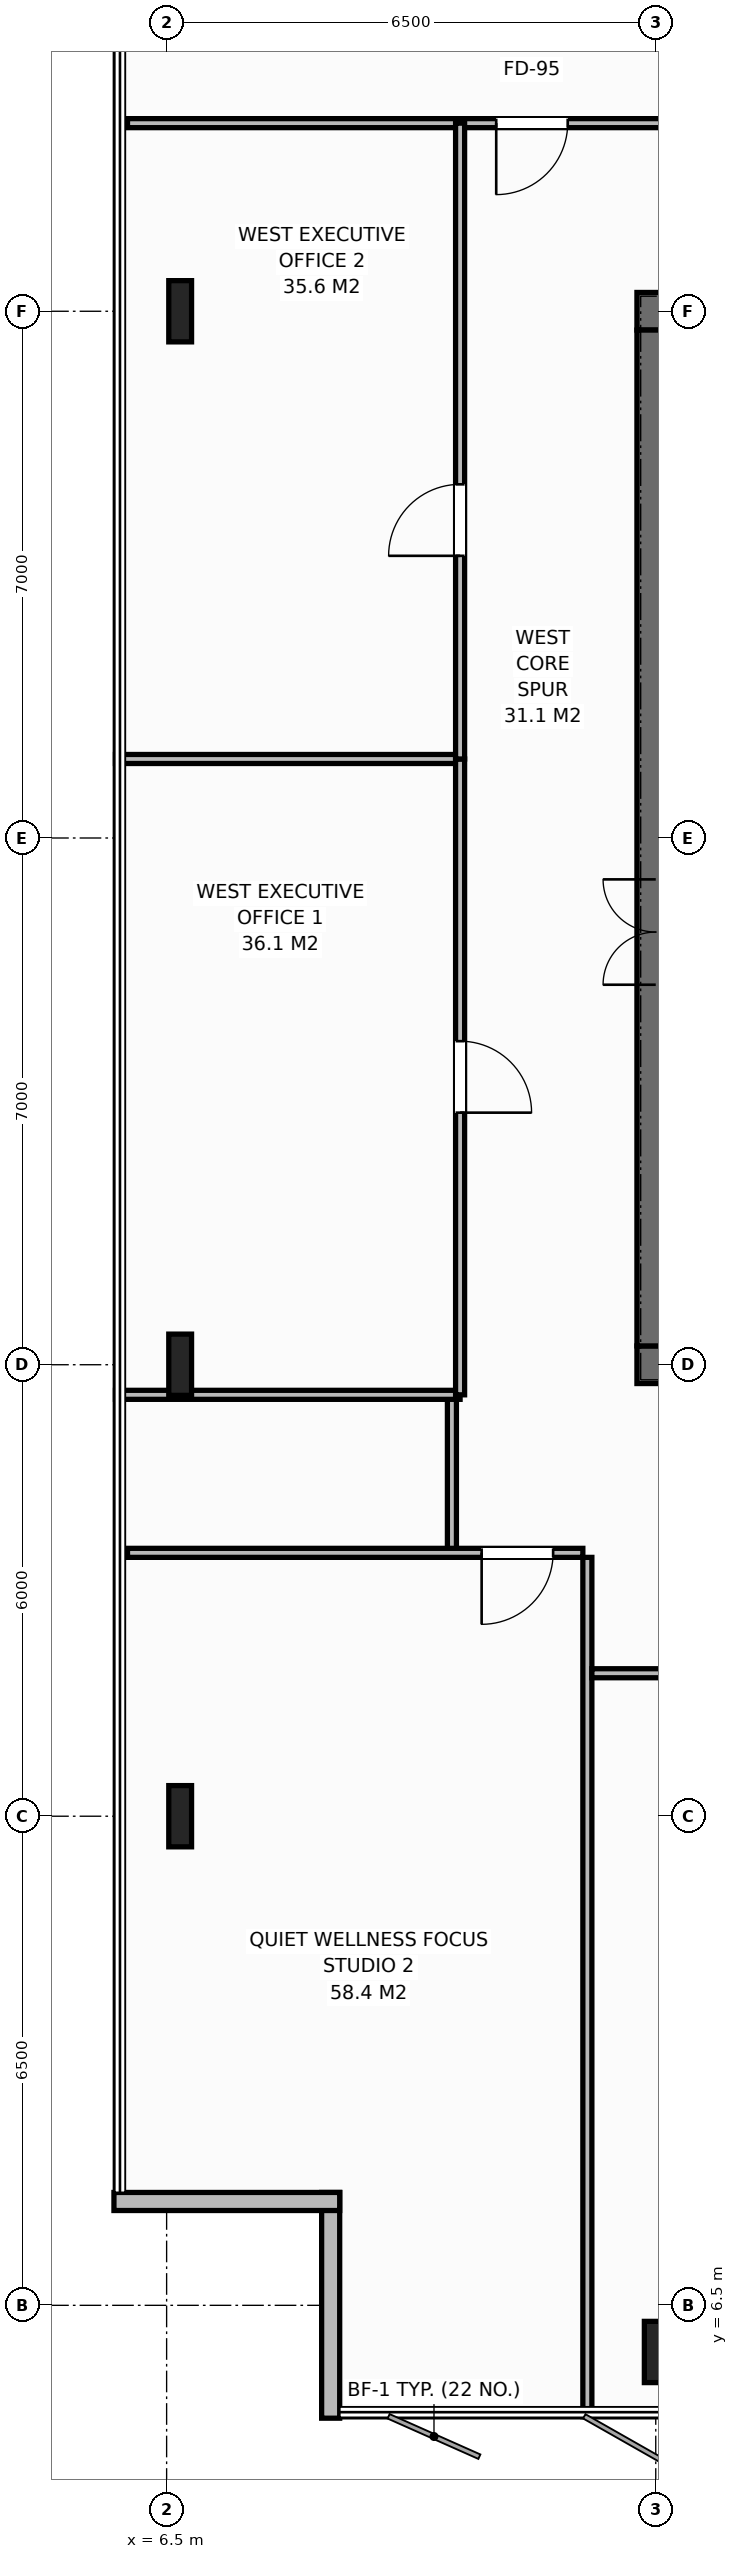
"""IFC4 building model, lengths in metres.
Left out: names, types, materials, properties, quantities, classifications, styles, units other than length and angle.
Written with IfcOpenShell. Run it as: python <this file> out.ifc"""

import sys

from ifc_helpers import new_model, si_unit, direction, frame, frame_2d, origin, origin_2d, place, context, subcontext, project, spatial, rectangle, i_section, extrude, element, fill, save


model = new_model("IFC4")
c1 = context("Model", 3, precision=1e-05, world=origin(), true_north=direction((0.0, 1.0)))
c2 = subcontext(c1, "Body", "Model", "MODEL_VIEW")
j1 = project(units=[si_unit("LENGTHUNIT", "METRE"), si_unit("PLANEANGLEUNIT", "RADIAN")], contexts=[c1])
p1 = place(None, origin())
s1 = spatial("IfcSite", under=j1, at=p1, CompositionType="ELEMENT")
p2 = place(p1, origin())
s2 = spatial("IfcBuilding", under=s1, at=p2, CompositionType="ELEMENT")
p3 = place(p2, frame((0.0, 0.0, 217.6)))
s3 = spatial("IfcBuildingStorey", under=s2, at=p3, CompositionType="ELEMENT", Elevation=217.6)
p4 = place(p3, frame((12.75, 19.0, 0.0), z_axis=(0.0, 0.0, 1.0), x_axis=(1.0, 0.0, 0.0)))
e1 = element("IfcWall", 1, at=p4, inside=s3, PredefinedType="SHEAR", context=c2, shape_type="SweptSolid", body=[
    extrude(rectangle(XDim=13.5, YDim=0.5, at=frame_2d((6.75, 0.0))), origin(), (0.0, 0.0, 1.0), 3.8),
])
p5 = place(p4, frame((9.13, 0.0, 0.0)))
e2 = element("IfcOpeningElement", 2, at=p5, cuts=e1, PredefinedType="OPENING", context=c2, shape_type="SweptSolid", body=[
    extrude(rectangle(XDim=1.4, YDim=2.2, at=frame_2d((0.7, 1.1))), frame((0.0, 0.26, 0.0), z_axis=(0.0, -1.0, 0.0), x_axis=(1.0, 0.0, 0.0)), (0.0, 0.0, 1.0), 0.52),
])
p6 = place(p3, frame((12.75, 33.0, 0.0), z_axis=(0.0, 0.0, 1.0), x_axis=(1.0, 0.0, 0.0)))
e3 = element("IfcWall", 3, at=p6, inside=s3, PredefinedType="SHEAR", context=c2, shape_type="SweptSolid", body=[
    extrude(rectangle(XDim=13.5, YDim=0.5, at=frame_2d((6.75, 0.0))), origin(), (0.0, 0.0, 1.0), 3.8),
])
p7 = place(p6, frame((1.15, 0.0, 0.0)))
e4 = element("IfcOpeningElement", 4, at=p7, cuts=e3, PredefinedType="OPENING", context=c2, shape_type="SweptSolid", body=[
    extrude(rectangle(XDim=0.9, YDim=2.15, at=frame_2d((0.45, 1.075))), frame((0.0, 0.26, 0.0), z_axis=(0.0, -1.0, 0.0), x_axis=(1.0, 0.0, 0.0)), (0.0, 0.0, 1.0), 0.52),
])
p8 = place(p6, frame((3.05, 0.0, 0.0)))
e5 = element("IfcOpeningElement", 5, at=p8, cuts=e3, PredefinedType="OPENING", context=c2, shape_type="SweptSolid", body=[
    extrude(rectangle(XDim=0.9, YDim=2.15, at=frame_2d((0.45, 1.075))), frame((0.0, 0.26, 0.0), z_axis=(0.0, -1.0, 0.0), x_axis=(1.0, 0.0, 0.0)), (0.0, 0.0, 1.0), 0.52),
])
p9 = place(p6, frame((4.85, 0.0, 0.0)))
e6 = element("IfcOpeningElement", 6, at=p9, cuts=e3, PredefinedType="OPENING", context=c2, shape_type="SweptSolid", body=[
    extrude(rectangle(XDim=0.9, YDim=2.15, at=frame_2d((0.45, 1.075))), frame((0.0, 0.26, 0.0), z_axis=(0.0, -1.0, 0.0), x_axis=(1.0, 0.0, 0.0)), (0.0, 0.0, 1.0), 0.52),
])
p10 = place(p6, frame((6.75, 0.0, 0.0)))
e7 = element("IfcOpeningElement", 7, at=p10, cuts=e3, PredefinedType="OPENING", context=c2, shape_type="SweptSolid", body=[
    extrude(rectangle(XDim=0.9, YDim=2.15, at=frame_2d((0.45, 1.075))), frame((0.0, 0.26, 0.0), z_axis=(0.0, -1.0, 0.0), x_axis=(1.0, 0.0, 0.0)), (0.0, 0.0, 1.0), 0.52),
])
p11 = place(p6, frame((9.13, 0.0, 0.0)))
e8 = element("IfcOpeningElement", 8, at=p11, cuts=e3, PredefinedType="OPENING", context=c2, shape_type="SweptSolid", body=[
    extrude(rectangle(XDim=1.4, YDim=2.2, at=frame_2d((0.7, 1.1))), frame((0.0, 0.26, 0.0), z_axis=(0.0, -1.0, 0.0), x_axis=(1.0, 0.0, 0.0)), (0.0, 0.0, 1.0), 0.52),
])
p12 = place(p3, frame((13.0, 19.25, 0.0), z_axis=(0.0, 0.0, 1.0), x_axis=(0.0, 1.0, 0.0)))
e9 = element("IfcWall", 9, at=p12, inside=s3, PredefinedType="SHEAR", context=c2, shape_type="SweptSolid", body=[
    extrude(rectangle(XDim=13.5, YDim=0.5, at=frame_2d((6.75, 0.0))), origin(), (0.0, 0.0, 1.0), 3.8),
])
p13 = place(p12, frame((4.8, 0.0, 0.0)))
e10 = element("IfcOpeningElement", 10, at=p13, cuts=e9, PredefinedType="OPENING", context=c2, shape_type="SweptSolid", body=[
    extrude(rectangle(XDim=1.4, YDim=2.2, at=frame_2d((0.7, 1.1))), frame((0.0, 0.26, 0.0), z_axis=(0.0, -1.0, 0.0), x_axis=(1.0, 0.0, 0.0)), (0.0, 0.0, 1.0), 0.52),
])
for number, where, z_axis, x_axis in (
    (11, (13.0, 5.88, 0.0), (0.0, 0.0, 1.0), (1.0, 0.0, 0.0)),
    (12, (6.68, 13.0, 0.0), (0.0, 0.0, 1.0), (1.0, 0.0, 0.0)),
    (13, (6.68, 19.0, 0.0), (0.0, 0.0, 1.0), (1.0, 0.0, 0.0)),
    (14, (6.68, 33.0, 0.0), (0.0, 0.0, 1.0), (1.0, 0.0, 0.0)),
):
    element("IfcColumn", number, at=place(p3, frame(where, z_axis=z_axis, x_axis=x_axis)), inside=s3, PredefinedType="COLUMN", context=c2, shape_type="SweptSolid", body=[
        extrude(i_section(OverallWidth=0.303, OverallDepth=0.814, WebThickness=0.021, FlangeThickness=0.04, at=origin_2d()), origin(), (0.0, 0.0, 1.0), 3.8),
    ])
for number, where, z_axis, x_axis in (
    (15, (8.68, 5.0, 0.0), (0.0, 0.0, 1.0), (0.0, 1.0, 0.0)),
    (16, (8.8, 7.88, 0.0), (0.0, 0.0, 1.0), (-1.0, 0.0, 0.0)),
):
    element("IfcWall", number, at=place(p3, frame(where, z_axis=z_axis, x_axis=x_axis)), inside=s3, PredefinedType="STANDARD", context=c2, shape_type="SweptSolid", body=[
        extrude(rectangle(XDim=3.0, YDim=0.24, at=frame_2d((1.5, 0.0))), origin(), (0.0, 0.0, 1.0), 3.58),
    ])
p14 = place(p3, frame((10.291, 16.5, 0.0), z_axis=(0.0, 0.0, 1.0), x_axis=(0.0, 1.0, 0.0)))
e17 = element("IfcWall", 17, at=p14, inside=s3, PredefinedType="PARTITIONING", context=c2, shape_type="SweptSolid", body=[
    extrude(rectangle(XDim=2.1, YDim=0.12, at=frame_2d((1.05, 0.0))), origin(), (0.0, 0.0, 1.0), 3.58),
])
p15 = place(p3, frame((5.98, 35.5, 0.0), z_axis=(0.0, 0.0, 1.0), x_axis=(1.0, 0.0, 0.0)))
e18 = element("IfcWall", 18, at=p15, inside=s3, PredefinedType="PARTITIONING", context=c2, shape_type="SweptSolid", body=[
    extrude(rectangle(XDim=12.329, YDim=0.12, at=frame_2d((6.165, 0.0))), origin(), (0.0, 0.0, 1.0), 3.58),
])
p16 = place(p15, frame((4.9, 0.0, 0.0)))
e19 = element("IfcOpeningElement", 19, at=p16, cuts=e18, PredefinedType="OPENING", context=c2, shape_type="SweptSolid", body=[
    extrude(rectangle(XDim=0.95, YDim=2.15, at=frame_2d((0.475, 1.075))), frame((0.0, 0.07, 0.0), z_axis=(0.0, -1.0, 0.0), x_axis=(1.0, 0.0, 0.0)), (0.0, 0.0, 1.0), 0.14),
])
p17 = place(p3, frame((12.091, 5.02, 0.0), z_axis=(0.0, 0.0, 1.0), x_axis=(0.0, 1.0, 0.0)))
e20 = element("IfcWall", 20, at=p17, inside=s3, PredefinedType="PARTITIONING", context=c2, shape_type="SweptSolid", body=[
    extrude(rectangle(XDim=11.42, YDim=0.12, at=frame_2d((5.71, 0.0))), origin(), (0.0, 0.0, 1.0), 3.58),
])
p18 = place(p3, frame((5.98, 16.5, 0.0), z_axis=(0.0, 0.0, 1.0), x_axis=(1.0, 0.0, 0.0)))
e21 = element("IfcWall", 21, at=p18, inside=s3, PredefinedType="PARTITIONING", context=c2, shape_type="SweptSolid", body=[
    extrude(rectangle(XDim=6.051, YDim=0.12, at=frame_2d((3.026, 0.0))), origin(), (0.0, 0.0, 1.0), 3.58),
])
p19 = place(p18, frame((4.706, 0.0, 0.0)))
e22 = element("IfcOpeningElement", 22, at=p19, cuts=e21, PredefinedType="OPENING", context=c2, shape_type="SweptSolid", body=[
    extrude(rectangle(XDim=0.95, YDim=2.15, at=frame_2d((0.475, 1.075))), frame((0.0, 0.07, 0.0), z_axis=(0.0, -1.0, 0.0), x_axis=(1.0, 0.0, 0.0)), (0.0, 0.0, 1.0), 0.14),
])
p20 = place(p3, frame((12.151, 14.9, 0.0), z_axis=(0.0, 0.0, 1.0), x_axis=(1.0, 0.0, 0.0)))
e23 = element("IfcWall", 23, at=p20, inside=s3, PredefinedType="PARTITIONING", context=c2, shape_type="SweptSolid", body=[
    extrude(rectangle(XDim=6.067, YDim=0.12, at=frame_2d((3.033, 0.0))), origin(), (0.0, 0.0, 1.0), 3.58),
])
p21 = place(p20, frame((2.558, 0.0, 0.0)))
e24 = element("IfcOpeningElement", 24, at=p21, cuts=e23, PredefinedType="OPENING", context=c2, shape_type="SweptSolid", body=[
    extrude(rectangle(XDim=0.95, YDim=2.15, at=frame_2d((0.475, 1.075))), frame((0.0, 0.07, 0.0), z_axis=(0.0, -1.0, 0.0), x_axis=(1.0, 0.0, 0.0)), (0.0, 0.0, 1.0), 0.14),
])
for number, where, z_axis, x_axis in (
    (25, (5.82, 18.6, 0.0), (0.0, 0.0, 1.0), (1.0, 0.0, 0.0)),
    (26, (5.82, 27.05, 0.0), (0.0, 0.0, 1.0), (1.0, 0.0, 0.0)),
):
    element("IfcWall", number, at=place(p3, frame(where, z_axis=z_axis, x_axis=x_axis)), inside=s3, PredefinedType="PARTITIONING", context=c2, shape_type="SweptSolid", body=[
        extrude(rectangle(XDim=4.58, YDim=0.12, at=frame_2d((2.29, 0.0))), origin(), (0.0, 0.0, 1.0), 3.58),
    ])
p22 = place(p3, frame((10.4, 18.6, 0.0), z_axis=(0.0, 0.0, 1.0), x_axis=(0.0, 1.0, 0.0)))
e27 = element("IfcWall", 27, at=p22, inside=s3, PredefinedType="PARTITIONING", context=c2, shape_type="SweptSolid", body=[
    extrude(rectangle(XDim=8.45, YDim=0.12, at=frame_2d((4.225, 0.0))), origin(), (0.0, 0.0, 1.0), 3.58),
])
p23 = place(p22, frame((3.75, 0.0, 0.0)))
e28 = element("IfcOpeningElement", 28, at=p23, cuts=e27, PredefinedType="OPENING", context=c2, shape_type="SweptSolid", body=[
    extrude(rectangle(XDim=0.95, YDim=2.15, at=frame_2d((0.475, 1.075))), frame((0.0, 0.07, 0.0), z_axis=(0.0, -1.0, 0.0), x_axis=(1.0, 0.0, 0.0)), (0.0, 0.0, 1.0), 0.14),
])
p24 = place(p3, frame((10.4, 27.05, 0.0), z_axis=(0.0, 0.0, 1.0), x_axis=(0.0, 1.0, 0.0)))
e29 = element("IfcWall", 29, at=p24, inside=s3, PredefinedType="PARTITIONING", context=c2, shape_type="SweptSolid", body=[
    extrude(rectangle(XDim=8.45, YDim=0.12, at=frame_2d((4.225, 0.0))), origin(), (0.0, 0.0, 1.0), 3.58),
])
p25 = place(p24, frame((2.7, 0.0, 0.0)))
e30 = element("IfcOpeningElement", 30, at=p25, cuts=e29, PredefinedType="OPENING", context=c2, shape_type="SweptSolid", body=[
    extrude(rectangle(XDim=0.95, YDim=2.15, at=frame_2d((0.475, 1.075))), frame((0.0, 0.07, 0.0), z_axis=(0.0, -1.0, 0.0), x_axis=(1.0, 0.0, 0.0)), (0.0, 0.0, 1.0), 0.14),
])
p26 = place(p13, origin())
e31 = element("IfcDoor", 31, at=p26, inside=s3, OperationType="DOUBLE_DOOR_SINGLE_SWING", PredefinedType="DOOR", context=c2, shape_type="SweptSolid", body=[
    extrude(rectangle(XDim=1.4, YDim=2.2, at=frame_2d((0.7, 1.1))), frame((0.0, 0.025, 0.0), z_axis=(0.0, -1.0, 0.0), x_axis=(1.0, 0.0, 0.0)), (0.0, 0.0, 1.0), 0.05),
])
fill(e10, e31)
p27 = place(p16, origin())
e32 = element("IfcDoor", 32, at=p27, inside=s3, OperationType="SINGLE_SWING_RIGHT", PredefinedType="DOOR", context=c2, shape_type="SweptSolid", body=[
    extrude(rectangle(XDim=0.95, YDim=2.15, at=frame_2d((0.475, 1.075))), frame((0.0, 0.025, 0.0), z_axis=(0.0, -1.0, 0.0), x_axis=(1.0, 0.0, 0.0)), (0.0, 0.0, 1.0), 0.05),
])
fill(e19, e32)
p28 = place(p19, origin())
e33 = element("IfcDoor", 33, at=p28, inside=s3, OperationType="SINGLE_SWING_RIGHT", PredefinedType="DOOR", context=c2, shape_type="SweptSolid", body=[
    extrude(rectangle(XDim=0.95, YDim=2.15, at=frame_2d((0.475, 1.075))), frame((0.0, 0.025, 0.0), z_axis=(0.0, -1.0, 0.0), x_axis=(1.0, 0.0, 0.0)), (0.0, 0.0, 1.0), 0.05),
])
fill(e22, e33)
p29 = place(p23, origin())
e34 = element("IfcDoor", 34, at=p29, inside=s3, OperationType="SINGLE_SWING_RIGHT", PredefinedType="DOOR", context=c2, shape_type="SweptSolid", body=[
    extrude(rectangle(XDim=0.95, YDim=2.15, at=frame_2d((0.475, 1.075))), frame((0.0, 0.025, 0.0), z_axis=(0.0, -1.0, 0.0), x_axis=(1.0, 0.0, 0.0)), (0.0, 0.0, 1.0), 0.05),
])
fill(e28, e34)
p30 = place(p25, origin())
e35 = element("IfcDoor", 35, at=p30, inside=s3, OperationType="SINGLE_SWING_LEFT", PredefinedType="DOOR", context=c2, shape_type="SweptSolid", body=[
    extrude(rectangle(XDim=0.95, YDim=2.15, at=frame_2d((0.475, 1.075))), frame((0.0, 0.025, 0.0), z_axis=(0.0, -1.0, 0.0), x_axis=(1.0, 0.0, 0.0)), (0.0, 0.0, 1.0), 0.05),
])
fill(e30, e35)
save(model, sys.argv[1])
